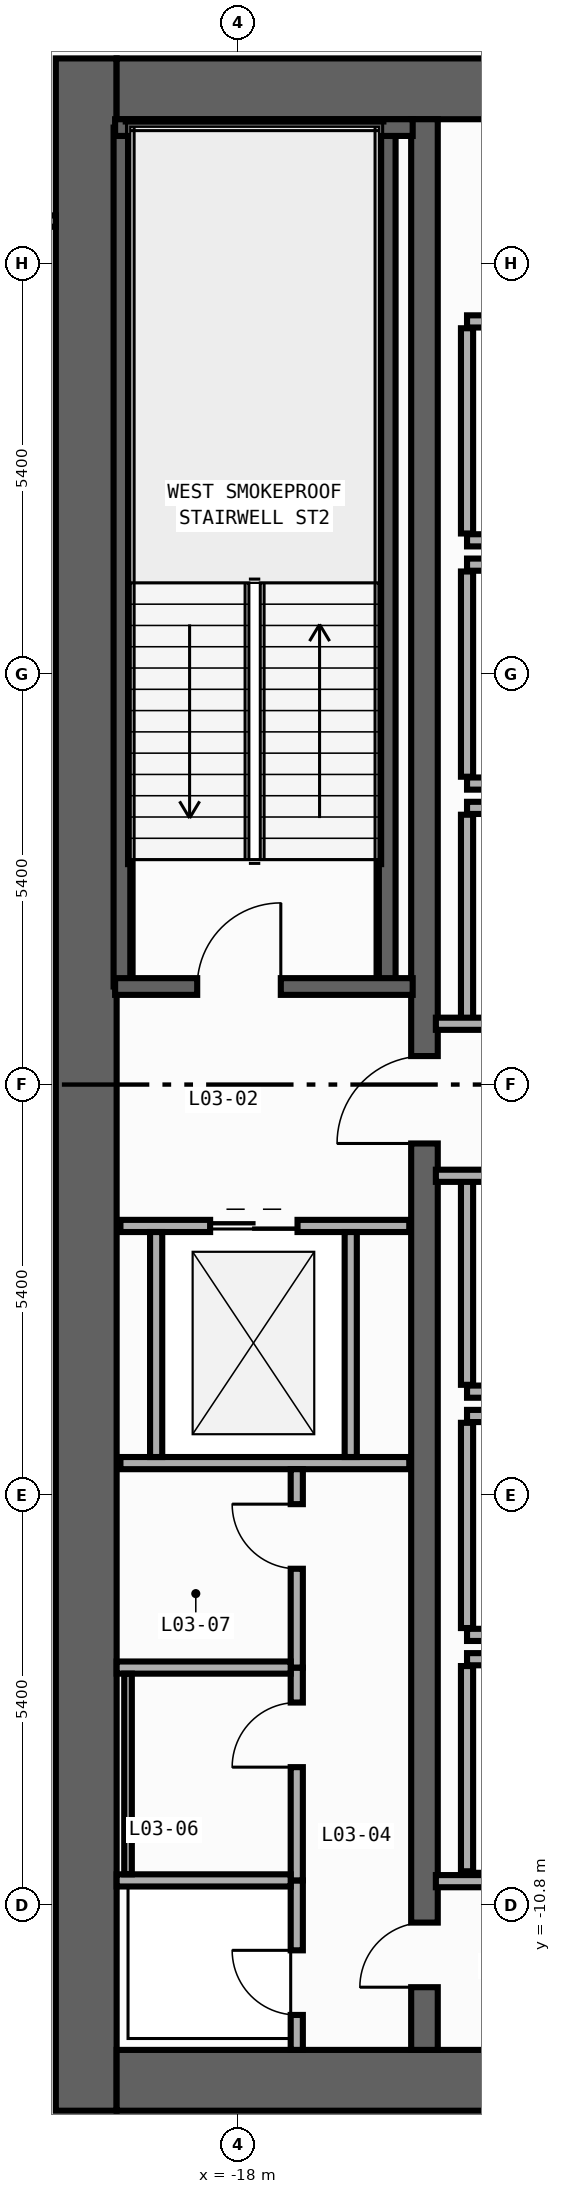
"""IFC4 building model, lengths in metres.
Left out: names, types, materials, properties, quantities, classifications, styles, units other than length and angle.
Written with IfcOpenShell. Run it as: python <this file> out.ifc"""

import sys

from ifc_helpers import new_model, si_unit, direction, frame, frame_2d, origin, place, context, subcontext, project, spatial, rectangle, extrude, element, fill, save


model = new_model("IFC4")
c1 = context("Model", 3, precision=1e-05, world=origin(), true_north=direction((0.0, 1.0)))
c2 = subcontext(c1, "Body", "Model", "MODEL_VIEW")
j1 = project(units=[si_unit("LENGTHUNIT", "METRE"), si_unit("PLANEANGLEUNIT", "RADIAN")], contexts=[c1])
p1 = place(None, origin())
s1 = spatial("IfcSite", under=j1, at=p1, CompositionType="ELEMENT")
p2 = place(p1, origin())
s2 = spatial("IfcBuilding", under=s1, at=p2, CompositionType="ELEMENT")
p3 = place(p2, frame((0.0, 0.0, 11.0)))
s3 = spatial("IfcBuildingStorey", under=s2, at=p3, CompositionType="ELEMENT", Elevation=11.0)
p4 = place(p3, frame((-20.0, -13.5, 0.0), z_axis=(0.0, 0.0, 1.0), x_axis=(0.0, 1.0, 0.0)))
e1 = element("IfcWall", 1, at=p4, inside=s3, PredefinedType="SHEAR", context=c2, shape_type="SweptSolid", body=[
    extrude(rectangle(XDim=27.0, YDim=0.8, at=frame_2d((13.5, 0.0))), origin(), (0.0, 0.0, 1.0), 4.7),
])
for number, where, z_axis, x_axis in (
    (2, (-19.6, -13.1, 0.0), (0.0, 0.0, 1.0), (1.0, 0.0, 0.0)),
    (3, (-19.6, 13.1, 0.0), (0.0, 0.0, 1.0), (1.0, 0.0, 0.0)),
):
    element("IfcWall", number, at=place(p3, frame(where, z_axis=z_axis, x_axis=x_axis)), inside=s3, PredefinedType="SHEAR", context=c2, shape_type="SweptSolid", body=[
        extrude(rectangle(XDim=6.8, YDim=0.8, at=frame_2d((3.4, 0.0))), origin(), (0.0, 0.0, 1.0), 4.7),
    ])
p5 = place(p3, frame((-15.55, -12.7, 0.0), z_axis=(0.0, 0.0, 1.0), x_axis=(0.0, 1.0, 0.0)))
e4 = element("IfcWall", 4, at=p5, inside=s3, PredefinedType="SHEAR", context=c2, shape_type="SweptSolid", body=[
    extrude(rectangle(XDim=25.4, YDim=0.35, at=frame_2d((12.7, 0.0))), origin(), (0.0, 0.0, 1.0), 4.7),
])
p6 = place(p5, frame((11.925, 0.0, 0.0)))
e5 = element("IfcOpeningElement", 5, at=p6, cuts=e4, PredefinedType="OPENING", context=c2, shape_type="SweptSolid", body=[
    extrude(rectangle(XDim=1.15, YDim=2.2, at=frame_2d((0.575, 1.1))), frame((0.0, 0.185, 0.0), z_axis=(0.0, -1.0, 0.0), x_axis=(1.0, 0.0, 0.0)), (0.0, 0.0, 1.0), 0.37),
])
p7 = place(p5, frame((0.825, 0.0, 0.0)))
e6 = element("IfcOpeningElement", 6, at=p7, cuts=e4, PredefinedType="OPENING", context=c2, shape_type="SweptSolid", body=[
    extrude(rectangle(XDim=0.85, YDim=2.1, at=frame_2d((0.425, 1.05))), frame((0.0, 0.185, 0.0), z_axis=(0.0, -1.0, 0.0), x_axis=(1.0, 0.0, 0.0)), (0.0, 0.0, 1.0), 0.37),
])
for number, where, z_axis, x_axis in (
    (7, (-16.04, 1.29, 0.0), (0.0, 0.0, 1.0), (0.0, 1.0, 0.0)),
    (8, (-19.53, 1.29, 0.0), (0.0, 0.0, 1.0), (0.0, 1.0, 0.0)),
):
    element("IfcWall", number, at=place(p3, frame(where, z_axis=z_axis, x_axis=x_axis)), inside=s3, PredefinedType="SHEAR", context=c2, shape_type="SweptSolid", body=[
        extrude(rectangle(XDim=11.3, YDim=0.22, at=frame_2d((5.65, 0.0))), origin(), (0.0, 0.0, 1.0), 4.7),
    ])
p8 = place(p3, frame((-19.62, 12.59, 0.0), z_axis=(0.0, 0.0, 1.0), x_axis=(1.0, 0.0, 0.0)))
e9 = element("IfcWall", 9, at=p8, inside=s3, PredefinedType="SHEAR", context=c2, shape_type="SweptSolid", body=[
    extrude(rectangle(XDim=3.915, YDim=0.22, at=frame_2d((1.958, 0.0))), origin(), (0.0, 0.0, 1.0), 4.7),
])
p9 = place(p3, frame((-19.62, 1.29, 0.0), z_axis=(0.0, 0.0, 1.0), x_axis=(1.0, 0.0, 0.0)))
e10 = element("IfcWall", 10, at=p9, inside=s3, PredefinedType="SHEAR", context=c2, shape_type="SweptSolid", body=[
    extrude(rectangle(XDim=3.915, YDim=0.22, at=frame_2d((1.958, 0.0))), origin(), (0.0, 0.0, 1.0), 4.7),
])
p10 = place(p9, frame((1.08, 0.0, 0.0)))
e11 = element("IfcOpeningElement", 11, at=p10, cuts=e10, PredefinedType="OPENING", context=c2, shape_type="SweptSolid", body=[
    extrude(rectangle(XDim=1.1, YDim=2.2, at=frame_2d((0.55, 1.1))), frame((0.0, 0.12, 0.0), z_axis=(0.0, -1.0, 0.0), x_axis=(1.0, 0.0, 0.0)), (0.0, 0.0, 1.0), 0.24),
])
for number, where, z_axis, x_axis in (
    (12, (-14.99, 7.16, 0.0), (0.0, 0.0, 1.0), (1.0, 0.0, 0.0)),
    (13, (-14.99, 10.04, 0.0), (0.0, 0.0, 1.0), (1.0, 0.0, 0.0)),
):
    element("IfcWall", number, at=place(p3, frame(where, z_axis=z_axis, x_axis=x_axis)), inside=s3, PredefinedType="STANDARD", context=c2, shape_type="SweptSolid", body=[
        extrude(rectangle(XDim=2.19, YDim=0.16, at=frame_2d((1.095, 0.0))), origin(), (0.0, 0.0, 1.0), 4.7),
    ])
p11 = place(p3, frame((-14.99, 7.25, 0.0), z_axis=(0.0, 0.0, 1.0), x_axis=(0.0, 1.0, 0.0)))
e14 = element("IfcWall", 14, at=p11, inside=s3, PredefinedType="STANDARD", context=c2, shape_type="SweptSolid", body=[
    extrude(rectangle(XDim=2.7, YDim=0.16, at=frame_2d((1.35, 0.0))), origin(), (0.0, 0.0, 1.0), 4.7),
])
for number, where, z_axis, x_axis in (
    (15, (-14.99, 3.96, 0.0), (0.0, 0.0, 1.0), (1.0, 0.0, 0.0)),
    (16, (-14.99, 6.84, 0.0), (0.0, 0.0, 1.0), (1.0, 0.0, 0.0)),
):
    element("IfcWall", number, at=place(p3, frame(where, z_axis=z_axis, x_axis=x_axis)), inside=s3, PredefinedType="STANDARD", context=c2, shape_type="SweptSolid", body=[
        extrude(rectangle(XDim=2.19, YDim=0.16, at=frame_2d((1.095, 0.0))), origin(), (0.0, 0.0, 1.0), 4.7),
    ])
p12 = place(p3, frame((-14.99, 4.05, 0.0), z_axis=(0.0, 0.0, 1.0), x_axis=(0.0, 1.0, 0.0)))
e17 = element("IfcWall", 17, at=p12, inside=s3, PredefinedType="STANDARD", context=c2, shape_type="SweptSolid", body=[
    extrude(rectangle(XDim=2.7, YDim=0.16, at=frame_2d((1.35, 0.0))), origin(), (0.0, 0.0, 1.0), 4.7),
])
p13 = place(p3, frame((-14.99, 3.64, 0.0), z_axis=(0.0, 0.0, 1.0), x_axis=(1.0, 0.0, 0.0)))
e18 = element("IfcWall", 18, at=p13, inside=s3, PredefinedType="STANDARD", context=c2, shape_type="SweptSolid", body=[
    extrude(rectangle(XDim=2.19, YDim=0.16, at=frame_2d((1.095, 0.0))), origin(), (0.0, 0.0, 1.0), 4.7),
])
p14 = place(p3, frame((-14.99, 0.85, 0.0), z_axis=(0.0, 0.0, 1.0), x_axis=(0.0, 1.0, 0.0)))
e19 = element("IfcWall", 19, at=p14, inside=s3, PredefinedType="STANDARD", context=c2, shape_type="SweptSolid", body=[
    extrude(rectangle(XDim=2.7, YDim=0.16, at=frame_2d((1.35, 0.0))), origin(), (0.0, 0.0, 1.0), 4.7),
])
p15 = place(p3, frame((-14.99, -4.04, 0.0), z_axis=(0.0, 0.0, 1.0), x_axis=(1.0, 0.0, 0.0)))
e20 = element("IfcWall", 20, at=p15, inside=s3, PredefinedType="STANDARD", context=c2, shape_type="SweptSolid", body=[
    extrude(rectangle(XDim=2.19, YDim=0.16, at=frame_2d((1.095, 0.0))), origin(), (0.0, 0.0, 1.0), 4.7),
])
p16 = place(p3, frame((-14.99, -3.95, 0.0), z_axis=(0.0, 0.0, 1.0), x_axis=(0.0, 1.0, 0.0)))
e21 = element("IfcWall", 21, at=p16, inside=s3, PredefinedType="STANDARD", context=c2, shape_type="SweptSolid", body=[
    extrude(rectangle(XDim=2.7, YDim=0.16, at=frame_2d((1.35, 0.0))), origin(), (0.0, 0.0, 1.0), 4.7),
])
for number, where, z_axis, x_axis in (
    (22, (-14.99, -7.24, 0.0), (0.0, 0.0, 1.0), (1.0, 0.0, 0.0)),
    (23, (-14.99, -4.36, 0.0), (0.0, 0.0, 1.0), (1.0, 0.0, 0.0)),
):
    element("IfcWall", number, at=place(p3, frame(where, z_axis=z_axis, x_axis=x_axis)), inside=s3, PredefinedType="STANDARD", context=c2, shape_type="SweptSolid", body=[
        extrude(rectangle(XDim=2.19, YDim=0.16, at=frame_2d((1.095, 0.0))), origin(), (0.0, 0.0, 1.0), 4.7),
    ])
p17 = place(p3, frame((-14.99, -7.15, 0.0), z_axis=(0.0, 0.0, 1.0), x_axis=(0.0, 1.0, 0.0)))
e24 = element("IfcWall", 24, at=p17, inside=s3, PredefinedType="STANDARD", context=c2, shape_type="SweptSolid", body=[
    extrude(rectangle(XDim=2.7, YDim=0.16, at=frame_2d((1.35, 0.0))), origin(), (0.0, 0.0, 1.0), 4.7),
])
p18 = place(p3, frame((-14.99, -7.56, 0.0), z_axis=(0.0, 0.0, 1.0), x_axis=(1.0, 0.0, 0.0)))
e25 = element("IfcWall", 25, at=p18, inside=s3, PredefinedType="STANDARD", context=c2, shape_type="SweptSolid", body=[
    extrude(rectangle(XDim=2.19, YDim=0.16, at=frame_2d((1.095, 0.0))), origin(), (0.0, 0.0, 1.0), 4.7),
])
p19 = place(p3, frame((-14.99, -10.35, 0.0), z_axis=(0.0, 0.0, 1.0), x_axis=(0.0, 1.0, 0.0)))
e26 = element("IfcWall", 26, at=p19, inside=s3, PredefinedType="STANDARD", context=c2, shape_type="SweptSolid", body=[
    extrude(rectangle(XDim=2.7, YDim=0.16, at=frame_2d((1.35, 0.0))), origin(), (0.0, 0.0, 1.0), 4.7),
])
p20 = place(p3, frame((-19.55, -1.86, 0.0), z_axis=(0.0, 0.0, 1.0), x_axis=(1.0, 0.0, 0.0)))
e27 = element("IfcWall", 27, at=p20, inside=s3, PredefinedType="STANDARD", context=c2, shape_type="SweptSolid", body=[
    extrude(rectangle(XDim=3.8, YDim=0.16, at=frame_2d((1.9, 0.0))), origin(), (0.0, 0.0, 1.0), 4.7),
])
p21 = place(p20, frame((1.18, 0.0, 0.0)))
e28 = element("IfcOpeningElement", 28, at=p21, cuts=e27, PredefinedType="OPENING", context=c2, shape_type="SweptSolid", body=[
    extrude(rectangle(XDim=1.15, YDim=2.2, at=frame_2d((0.575, 1.1))), frame((0.0, 0.09, 0.0), z_axis=(0.0, -1.0, 0.0), x_axis=(1.0, 0.0, 0.0)), (0.0, 0.0, 1.0), 0.18),
])
p22 = place(p3, frame((-19.55, -4.98, 0.0), z_axis=(0.0, 0.0, 1.0), x_axis=(1.0, 0.0, 0.0)))
e29 = element("IfcWall", 29, at=p22, inside=s3, PredefinedType="STANDARD", context=c2, shape_type="SweptSolid", body=[
    extrude(rectangle(XDim=3.8, YDim=0.16, at=frame_2d((1.9, 0.0))), origin(), (0.0, 0.0, 1.0), 4.7),
])
for number, where, z_axis, x_axis in (
    (30, (-19.08, -4.9, 0.0), (0.0, 0.0, 1.0), (0.0, 1.0, 0.0)),
    (31, (-16.52, -4.9, 0.0), (0.0, 0.0, 1.0), (0.0, 1.0, 0.0)),
):
    element("IfcWall", number, at=place(p3, frame(where, z_axis=z_axis, x_axis=x_axis)), inside=s3, PredefinedType="STANDARD", context=c2, shape_type="SweptSolid", body=[
        extrude(rectangle(XDim=2.96, YDim=0.16, at=frame_2d((1.48, 0.0))), origin(), (0.0, 0.0, 1.0), 4.7),
    ])
for number, where, z_axis, x_axis in (
    (32, (-15.4, 0.8, 0.0), (0.0, 0.0, 1.0), (1.0, 0.0, 0.0)),
    (33, (-15.4, -1.2, 0.0), (0.0, 0.0, 1.0), (1.0, 0.0, 0.0)),
    (34, (-15.4, -10.48, 0.0), (0.0, 0.0, 1.0), (1.0, 0.0, 0.0)),
):
    element("IfcWall", number, at=place(p3, frame(where, z_axis=z_axis, x_axis=x_axis)), inside=s3, PredefinedType="STANDARD", context=c2, shape_type="SweptSolid", body=[
        extrude(rectangle(XDim=2.6, YDim=0.16, at=frame_2d((1.3, 0.0))), origin(), (0.0, 0.0, 1.0), 4.7),
    ])
p23 = place(p3, frame((-17.23, -12.7, 0.0), z_axis=(0.0, 0.0, 1.0), x_axis=(0.0, 1.0, 0.0)))
e35 = element("IfcWall", 35, at=p23, inside=s3, PredefinedType="PARTITIONING", context=c2, shape_type="SweptSolid", body=[
    extrude(rectangle(XDim=2.23, YDim=0.16, at=frame_2d((1.115, 0.0))), origin(), (0.0, 0.0, 1.0), 4.7),
])
p24 = place(p23, frame((0.46, 0.0, 0.0)))
e36 = element("IfcOpeningElement", 36, at=p24, cuts=e35, PredefinedType="OPENING", context=c2, shape_type="SweptSolid", body=[
    extrude(rectangle(XDim=0.85, YDim=2.1, at=frame_2d((0.425, 1.05))), frame((0.0, 0.09, 0.0), z_axis=(0.0, -1.0, 0.0), x_axis=(1.0, 0.0, 0.0)), (0.0, 0.0, 1.0), 0.18),
])
p25 = place(p3, frame((-17.23, -10.47, 0.0), z_axis=(0.0, 0.0, 1.0), x_axis=(0.0, 1.0, 0.0)))
e37 = element("IfcWall", 37, at=p25, inside=s3, PredefinedType="PARTITIONING", context=c2, shape_type="SweptSolid", body=[
    extrude(rectangle(XDim=2.8, YDim=0.16, at=frame_2d((1.4, 0.0))), origin(), (0.0, 0.0, 1.0), 4.7),
])
p26 = place(p25, frame((1.49, 0.0, 0.0)))
e38 = element("IfcOpeningElement", 38, at=p26, cuts=e37, PredefinedType="OPENING", context=c2, shape_type="SweptSolid", body=[
    extrude(rectangle(XDim=0.85, YDim=2.1, at=frame_2d((0.425, 1.05))), frame((0.0, 0.09, 0.0), z_axis=(0.0, -1.0, 0.0), x_axis=(1.0, 0.0, 0.0)), (0.0, 0.0, 1.0), 0.18),
])
p27 = place(p3, frame((-17.23, -7.67, 0.0), z_axis=(0.0, 0.0, 1.0), x_axis=(0.0, 1.0, 0.0)))
e39 = element("IfcWall", 39, at=p27, inside=s3, PredefinedType="PARTITIONING", context=c2, shape_type="SweptSolid", body=[
    extrude(rectangle(XDim=2.61, YDim=0.16, at=frame_2d((1.305, 0.0))), origin(), (0.0, 0.0, 1.0), 4.7),
])
p28 = place(p27, frame((1.3, 0.0, 0.0)))
e40 = element("IfcOpeningElement", 40, at=p28, cuts=e39, PredefinedType="OPENING", context=c2, shape_type="SweptSolid", body=[
    extrude(rectangle(XDim=0.85, YDim=2.1, at=frame_2d((0.425, 1.05))), frame((0.0, 0.09, 0.0), z_axis=(0.0, -1.0, 0.0), x_axis=(1.0, 0.0, 0.0)), (0.0, 0.0, 1.0), 0.18),
])
for number, where, z_axis, x_axis in (
    (41, (-19.6, -10.47, 0.0), (0.0, 0.0, 1.0), (1.0, 0.0, 0.0)),
    (42, (-19.6, -7.67, 0.0), (0.0, 0.0, 1.0), (1.0, 0.0, 0.0)),
):
    element("IfcWall", number, at=place(p3, frame(where, z_axis=z_axis, x_axis=x_axis)), inside=s3, PredefinedType="PARTITIONING", context=c2, shape_type="SweptSolid", body=[
        extrude(rectangle(XDim=2.29, YDim=0.16, at=frame_2d((1.145, 0.0))), origin(), (0.0, 0.0, 1.0), 4.7),
    ])
p29 = place(p3, frame((-24.445, 11.36, 0.0), z_axis=(0.0, 0.0, 1.0), x_axis=(1.0, 0.0, 0.0)))
e43 = element("IfcWall", 43, at=p29, inside=s3, PredefinedType="PARTITIONING", context=c2, shape_type="SweptSolid", body=[
    extrude(rectangle(XDim=4.045, YDim=0.15, at=frame_2d((2.022, 0.0))), origin(), (0.0, 0.0, 1.0), 4.7),
])
p30 = place(p3, frame((-19.45, -10.39, 0.0), z_axis=(0.0, 0.0, 1.0), x_axis=(0.0, 1.0, 0.0)))
e44 = element("IfcWall", 44, at=p30, inside=s3, PredefinedType="PARTITIONING", context=c2, shape_type="SweptSolid", body=[
    extrude(rectangle(XDim=2.64, YDim=0.1, at=frame_2d((1.32, 0.0))), origin(), (0.0, 0.0, 1.0), 4.7),
])
p31 = place(p10, origin())
e45 = element("IfcDoor", 45, at=p31, inside=s3, OperationType="SINGLE_SWING_RIGHT", PredefinedType="DOOR", context=c2, shape_type="SweptSolid", body=[
    extrude(rectangle(XDim=1.1, YDim=2.2, at=frame_2d((0.55, 1.1))), frame((0.0, 0.025, 0.0), z_axis=(0.0, -1.0, 0.0), x_axis=(1.0, 0.0, 0.0)), (0.0, 0.0, 1.0), 0.05),
])
fill(e11, e45)
p32 = place(p6, origin())
e46 = element("IfcDoor", 46, at=p32, inside=s3, OperationType="SINGLE_SWING_LEFT", PredefinedType="DOOR", context=c2, shape_type="SweptSolid", body=[
    extrude(rectangle(XDim=1.15, YDim=2.2, at=frame_2d((0.575, 1.1))), frame((0.0, 0.025, 0.0), z_axis=(0.0, -1.0, 0.0), x_axis=(1.0, 0.0, 0.0)), (0.0, 0.0, 1.0), 0.05),
])
fill(e5, e46)
p33 = place(p7, origin())
e47 = element("IfcDoor", 47, at=p33, inside=s3, OperationType="SINGLE_SWING_LEFT", PredefinedType="DOOR", context=c2, shape_type="SweptSolid", body=[
    extrude(rectangle(XDim=0.85, YDim=2.1, at=frame_2d((0.425, 1.05))), frame((0.0, 0.025, 0.0), z_axis=(0.0, -1.0, 0.0), x_axis=(1.0, 0.0, 0.0)), (0.0, 0.0, 1.0), 0.05),
])
fill(e6, e47)
p34 = place(p21, origin())
e48 = element("IfcDoor", 48, at=p34, inside=s3, OperationType="DOUBLE_DOOR_SLIDING", PredefinedType="DOOR", context=c2, shape_type="SweptSolid", body=[
    extrude(rectangle(XDim=1.15, YDim=2.2, at=frame_2d((0.575, 1.1))), frame((0.0, 0.025, 0.0), z_axis=(0.0, -1.0, 0.0), x_axis=(1.0, 0.0, 0.0)), (0.0, 0.0, 1.0), 0.05),
])
fill(e28, e48)
p35 = place(p24, origin())
e49 = element("IfcDoor", 49, at=p35, inside=s3, OperationType="SINGLE_SWING_RIGHT", PredefinedType="DOOR", context=c2, shape_type="SweptSolid", body=[
    extrude(rectangle(XDim=0.85, YDim=2.1, at=frame_2d((0.425, 1.05))), frame((0.0, 0.025, 0.0), z_axis=(0.0, -1.0, 0.0), x_axis=(1.0, 0.0, 0.0)), (0.0, 0.0, 1.0), 0.05),
])
fill(e36, e49)
p36 = place(p26, origin())
e50 = element("IfcDoor", 50, at=p36, inside=s3, OperationType="SINGLE_SWING_LEFT", PredefinedType="DOOR", context=c2, shape_type="SweptSolid", body=[
    extrude(rectangle(XDim=0.85, YDim=2.1, at=frame_2d((0.425, 1.05))), frame((0.0, 0.025, 0.0), z_axis=(0.0, -1.0, 0.0), x_axis=(1.0, 0.0, 0.0)), (0.0, 0.0, 1.0), 0.05),
])
fill(e38, e50)
p37 = place(p28, origin())
e51 = element("IfcDoor", 51, at=p37, inside=s3, OperationType="SINGLE_SWING_RIGHT", PredefinedType="DOOR", context=c2, shape_type="SweptSolid", body=[
    extrude(rectangle(XDim=0.85, YDim=2.1, at=frame_2d((0.425, 1.05))), frame((0.0, 0.025, 0.0), z_axis=(0.0, -1.0, 0.0), x_axis=(1.0, 0.0, 0.0)), (0.0, 0.0, 1.0), 0.05),
])
fill(e40, e51)
save(model, sys.argv[1])
